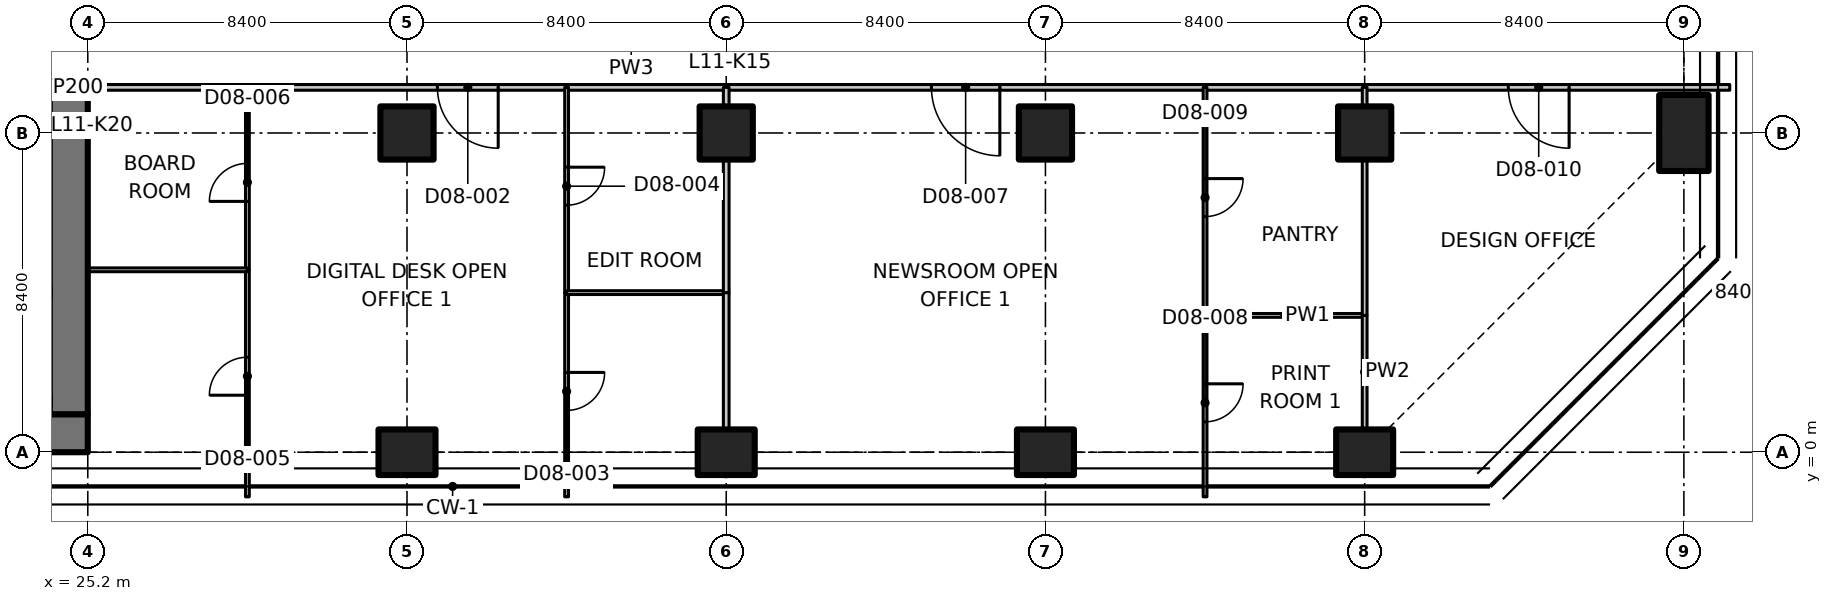
"""IFC4 building model, lengths in metres.
Left out: names, types, materials, properties, quantities, classifications, styles, units other than length and angle.
Written with IfcOpenShell. Run it as: python <this file> out.ifc"""

import sys

from ifc_helpers import new_model, si_unit, direction, frame, frame_2d, origin, origin_2d, place, context, subcontext, project, spatial, polyline, rectangle, outline, extrude, element, fill, save


model = new_model("IFC4")
c1 = context("Model", 3, precision=1e-05, world=origin(), true_north=direction((0.0, 1.0)))
c2 = subcontext(c1, "Body", "Model", "MODEL_VIEW")
j1 = project(units=[si_unit("LENGTHUNIT", "METRE"), si_unit("PLANEANGLEUNIT", "RADIAN")], contexts=[c1])
p1 = place(None, origin())
s1 = spatial("IfcSite", under=j1, at=p1, CompositionType="ELEMENT")
p2 = place(p1, origin())
s2 = spatial("IfcBuilding", under=s1, at=p2, CompositionType="ELEMENT")
p3 = place(p2, frame((0.0, 0.0, 54.5)))
s3 = spatial("IfcBuildingStorey", under=s2, at=p3, CompositionType="ELEMENT", Elevation=54.5)
p4 = place(p3, frame((33.6, 0.0, 0.0), z_axis=(0.0, 0.0, 1.0), x_axis=(0.0, 1.0, 0.0)))
e1 = element("IfcColumn", 1, at=p4, inside=s3, PredefinedType="COLUMN", context=c2, shape_type="SweptSolid", body=[
    extrude(rectangle(XDim=1.2, YDim=1.5, at=origin_2d()), origin(), (0.0, 0.0, 1.0), 3.35),
])
p5 = place(p3, frame((33.6, 8.4, 0.0), z_axis=(0.0, 0.0, 1.0), x_axis=(1.0, 0.0, 0.0)))
e2 = element("IfcColumn", 2, at=p5, inside=s3, PredefinedType="COLUMN", context=c2, shape_type="SweptSolid", body=[
    extrude(rectangle(XDim=1.4, YDim=1.4, at=origin_2d()), origin(), (0.0, 0.0, 1.0), 3.35),
])
p6 = place(p3, frame((42.0, 0.0, 0.0), z_axis=(0.0, 0.0, 1.0), x_axis=(0.0, 1.0, 0.0)))
e3 = element("IfcColumn", 3, at=p6, inside=s3, PredefinedType="COLUMN", context=c2, shape_type="SweptSolid", body=[
    extrude(rectangle(XDim=1.2, YDim=1.5, at=origin_2d()), origin(), (0.0, 0.0, 1.0), 3.35),
])
p7 = place(p3, frame((42.0, 8.4, 0.0), z_axis=(0.0, 0.0, 1.0), x_axis=(1.0, 0.0, 0.0)))
e4 = element("IfcColumn", 4, at=p7, inside=s3, PredefinedType="COLUMN", context=c2, shape_type="SweptSolid", body=[
    extrude(rectangle(XDim=1.4, YDim=1.4, at=origin_2d()), origin(), (0.0, 0.0, 1.0), 3.35),
])
p8 = place(p3, frame((50.4, 0.0, 0.0), z_axis=(0.0, 0.0, 1.0), x_axis=(0.0, 1.0, 0.0)))
e5 = element("IfcColumn", 5, at=p8, inside=s3, PredefinedType="COLUMN", context=c2, shape_type="SweptSolid", body=[
    extrude(rectangle(XDim=1.2, YDim=1.5, at=origin_2d()), origin(), (0.0, 0.0, 1.0), 3.35),
])
p9 = place(p3, frame((50.4, 8.4, 0.0), z_axis=(0.0, 0.0, 1.0), x_axis=(1.0, 0.0, 0.0)))
e6 = element("IfcColumn", 6, at=p9, inside=s3, PredefinedType="COLUMN", context=c2, shape_type="SweptSolid", body=[
    extrude(rectangle(XDim=1.4, YDim=1.4, at=origin_2d()), origin(), (0.0, 0.0, 1.0), 3.35),
])
p10 = place(p3, frame((58.8, 0.0, 0.0), z_axis=(0.0, 0.0, 1.0), x_axis=(0.0, 1.0, 0.0)))
e7 = element("IfcColumn", 7, at=p10, inside=s3, PredefinedType="COLUMN", context=c2, shape_type="SweptSolid", body=[
    extrude(rectangle(XDim=1.2, YDim=1.5, at=origin_2d()), origin(), (0.0, 0.0, 1.0), 3.35),
])
p11 = place(p3, frame((58.8, 8.4, 0.0), z_axis=(0.0, 0.0, 1.0), x_axis=(1.0, 0.0, 0.0)))
e8 = element("IfcColumn", 8, at=p11, inside=s3, PredefinedType="COLUMN", context=c2, shape_type="SweptSolid", body=[
    extrude(rectangle(XDim=1.4, YDim=1.4, at=origin_2d()), origin(), (0.0, 0.0, 1.0), 3.35),
])
p12 = place(p3, frame((67.2, 8.4, 0.0), z_axis=(0.0, 0.0, 1.0), x_axis=(1.0, 0.0, 0.0)))
e9 = element("IfcColumn", 9, at=p12, inside=s3, PredefinedType="COLUMN", context=c2, shape_type="SweptSolid", body=[
    extrude(rectangle(XDim=1.3, YDim=2.0, at=origin_2d()), origin(), (0.0, 0.0, 1.0), 3.35),
])
p13 = place(p3, frame((6.936, 0.5, 0.0), z_axis=(0.0, 0.0, 1.0), x_axis=(1.0, 0.0, 0.0)))
e10 = element("IfcWall", 10, at=p13, inside=s3, PredefinedType="SHEAR", context=c2, shape_type="SweptSolid", body=[
    extrude(rectangle(XDim=18.264, YDim=1.0, at=frame_2d((9.132, 0.0))), origin(), (0.0, 0.0, 1.0), 3.35),
])
p14 = place(p3, frame((24.7, 1.0, 0.0), z_axis=(0.0, 0.0, 1.0), x_axis=(0.0, 1.0, 0.0)))
e11 = element("IfcWall", 11, at=p14, inside=s3, PredefinedType="SHEAR", context=c2, shape_type="SweptSolid", body=[
    extrude(rectangle(XDim=8.8, YDim=1.0, at=frame_2d((4.4, 0.0))), origin(), (0.0, 0.0, 1.0), 3.35),
])
p15 = place(p3, frame((29.4, 9.6, 0.0), z_axis=(0.0, 0.0, 1.0), x_axis=(-1.0, 0.0, 0.0)))
e12 = element("IfcWall", 12, at=p15, inside=s3, PredefinedType="PARTITIONING", context=c2, shape_type="SweptSolid", body=[
    extrude(rectangle(XDim=4.2, YDim=0.15, at=frame_2d((2.1, 0.0))), origin(), (0.0, 0.0, 1.0), 3.33),
])
p16 = place(p3, frame((37.8, 9.6, 0.0), z_axis=(0.0, 0.0, 1.0), x_axis=(-1.0, 0.0, 0.0)))
e13 = element("IfcWall", 13, at=p16, inside=s3, PredefinedType="PARTITIONING", context=c2, shape_type="SweptSolid", body=[
    extrude(rectangle(XDim=8.4, YDim=0.15, at=frame_2d((4.2, 0.0))), origin(), (0.0, 0.0, 1.0), 3.33),
])
p17 = place(p16, frame((1.8, 0.0, 0.0)))
e14 = element("IfcOpeningElement", 14, at=p17, cuts=e13, PredefinedType="OPENING", context=c2, shape_type="SweptSolid", body=[
    extrude(rectangle(XDim=1.6, YDim=2.1, at=frame_2d((0.8, 1.05))), frame((0.0, 0.085, 0.0), z_axis=(0.0, -1.0, 0.0), x_axis=(1.0, 0.0, 0.0)), (0.0, 0.0, 1.0), 0.17),
])
p18 = place(p3, frame((42.0, 9.6, 0.0), z_axis=(0.0, 0.0, 1.0), x_axis=(-1.0, 0.0, 0.0)))
e15 = element("IfcWall", 15, at=p18, inside=s3, PredefinedType="PARTITIONING", context=c2, shape_type="SweptSolid", body=[
    extrude(rectangle(XDim=4.2, YDim=0.15, at=frame_2d((2.1, 0.0))), origin(), (0.0, 0.0, 1.0), 3.33),
])
p19 = place(p3, frame((54.6, 9.6, 0.0), z_axis=(0.0, 0.0, 1.0), x_axis=(-1.0, 0.0, 0.0)))
e16 = element("IfcWall", 16, at=p19, inside=s3, PredefinedType="PARTITIONING", context=c2, shape_type="SweptSolid", body=[
    extrude(rectangle(XDim=12.6, YDim=0.15, at=frame_2d((6.3, 0.0))), origin(), (0.0, 0.0, 1.0), 3.33),
])
p20 = place(p19, frame((5.4, 0.0, 0.0)))
e17 = element("IfcOpeningElement", 17, at=p20, cuts=e16, PredefinedType="OPENING", context=c2, shape_type="SweptSolid", body=[
    extrude(rectangle(XDim=1.8, YDim=2.1, at=frame_2d((0.9, 1.05))), frame((0.0, 0.085, 0.0), z_axis=(0.0, -1.0, 0.0), x_axis=(1.0, 0.0, 0.0)), (0.0, 0.0, 1.0), 0.17),
])
p21 = place(p3, frame((58.8, 9.6, 0.0), z_axis=(0.0, 0.0, 1.0), x_axis=(-1.0, 0.0, 0.0)))
e18 = element("IfcWall", 18, at=p21, inside=s3, PredefinedType="PARTITIONING", context=c2, shape_type="SweptSolid", body=[
    extrude(rectangle(XDim=4.2, YDim=0.15, at=frame_2d((2.1, 0.0))), origin(), (0.0, 0.0, 1.0), 3.33),
])
p22 = place(p3, frame((68.407, 9.6, 0.0), z_axis=(0.0, 0.0, 1.0), x_axis=(-1.0, 0.0, 0.0)))
e19 = element("IfcWall", 19, at=p22, inside=s3, PredefinedType="PARTITIONING", context=c2, shape_type="SweptSolid", body=[
    extrude(outline(polyline([(0.0, 0.0), (9.607, 0.0), (9.607, 3.33), (1.657, 3.33), (1.655, 2.98), (0.759, 2.98), (0.757, 3.33), (0.127, 3.33), (0.0, 3.33), (0.0, 0.0)])), frame((0.0, 0.075, 0.0), z_axis=(0.0, -1.0, 0.0), x_axis=(1.0, 0.0, 0.0)), (0.0, 0.0, 1.0), 0.15),
])
p23 = place(p22, frame((4.227, 0.0, 0.0)))
e20 = element("IfcOpeningElement", 20, at=p23, cuts=e19, PredefinedType="OPENING", context=c2, shape_type="SweptSolid", body=[
    extrude(rectangle(XDim=1.6, YDim=2.1, at=frame_2d((0.8, 1.05))), frame((0.0, 0.085, 0.0), z_axis=(0.0, -1.0, 0.0), x_axis=(1.0, 0.0, 0.0)), (0.0, 0.0, 1.0), 0.17),
])
p24 = place(p3, frame((37.8, 4.2, 0.0), z_axis=(0.0, 0.0, 1.0), x_axis=(0.0, -1.0, 0.0)))
e21 = element("IfcWall", 21, at=p24, inside=s3, PredefinedType="PARTITIONING", context=c2, shape_type="SweptSolid", body=[
    extrude(outline(polyline([(0.0, 0.0), (5.374, 0.0), (5.374, 3.33), (5.3, 3.33), (4.65, 3.33), (4.648, 2.98), (3.752, 2.98), (3.75, 3.33), (0.0, 3.33), (0.0, 0.0)])), frame((0.0, 0.05, 0.0), z_axis=(0.0, -1.0, 0.0), x_axis=(1.0, 0.0, 0.0)), (0.0, 0.0, 1.0), 0.1),
])
p25 = place(p24, frame((2.1, 0.0, 0.0)))
e22 = element("IfcOpeningElement", 22, at=p25, cuts=e21, PredefinedType="OPENING", context=c2, shape_type="SweptSolid", body=[
    extrude(rectangle(XDim=1.0, YDim=2.1, at=frame_2d((0.5, 1.05))), frame((0.0, 0.06, 0.0), z_axis=(0.0, -1.0, 0.0), x_axis=(1.0, 0.0, 0.0)), (0.0, 0.0, 1.0), 0.12),
])
p26 = place(p3, frame((37.8, 9.6, 0.0), z_axis=(0.0, 0.0, 1.0), x_axis=(0.0, -1.0, 0.0)))
e23 = element("IfcWall", 23, at=p26, inside=s3, PredefinedType="PARTITIONING", context=c2, shape_type="SweptSolid", body=[
    extrude(rectangle(XDim=5.4, YDim=0.1, at=frame_2d((2.7, 0.0))), origin(), (0.0, 0.0, 1.0), 3.33),
])
p27 = place(p26, frame((2.1, 0.0, 0.0)))
e24 = element("IfcOpeningElement", 24, at=p27, cuts=e23, PredefinedType="OPENING", context=c2, shape_type="SweptSolid", body=[
    extrude(rectangle(XDim=1.0, YDim=2.1, at=frame_2d((0.5, 1.05))), frame((0.0, 0.06, 0.0), z_axis=(0.0, -1.0, 0.0), x_axis=(1.0, 0.0, 0.0)), (0.0, 0.0, 1.0), 0.12),
])
p28 = place(p3, frame((29.4, -1.174, 0.0), z_axis=(0.0, 0.0, 1.0), x_axis=(0.0, 1.0, 0.0)))
e25 = element("IfcWall", 25, at=p28, inside=s3, PredefinedType="PARTITIONING", context=c2, shape_type="SweptSolid", body=[
    extrude(outline(polyline([(0.0, 0.0), (5.974, 0.0), (5.974, 3.33), (1.624, 3.33), (1.622, 2.98), (0.726, 2.98), (0.724, 3.33), (0.074, 3.33), (0.0, 3.33), (0.0, 0.0)])), frame((0.0, 0.05, 0.0), z_axis=(0.0, -1.0, 0.0), x_axis=(1.0, 0.0, 0.0)), (0.0, 0.0, 1.0), 0.1),
])
p29 = place(p28, frame((2.674, 0.0, 0.0)))
e26 = element("IfcOpeningElement", 26, at=p29, cuts=e25, PredefinedType="OPENING", context=c2, shape_type="SweptSolid", body=[
    extrude(rectangle(XDim=1.0, YDim=2.1, at=frame_2d((0.5, 1.05))), frame((0.0, 0.06, 0.0), z_axis=(0.0, -1.0, 0.0), x_axis=(1.0, 0.0, 0.0)), (0.0, 0.0, 1.0), 0.12),
])
p30 = place(p3, frame((29.4, 4.8, 0.0), z_axis=(0.0, 0.0, 1.0), x_axis=(0.0, 1.0, 0.0)))
e27 = element("IfcWall", 27, at=p30, inside=s3, PredefinedType="PARTITIONING", context=c2, shape_type="SweptSolid", body=[
    extrude(rectangle(XDim=4.8, YDim=0.1, at=frame_2d((2.4, 0.0))), origin(), (0.0, 0.0, 1.0), 3.33),
])
p31 = place(p30, frame((1.8, 0.0, 0.0)))
e28 = element("IfcOpeningElement", 28, at=p31, cuts=e27, PredefinedType="OPENING", context=c2, shape_type="SweptSolid", body=[
    extrude(rectangle(XDim=1.0, YDim=2.1, at=frame_2d((0.5, 1.05))), frame((0.0, 0.06, 0.0), z_axis=(0.0, -1.0, 0.0), x_axis=(1.0, 0.0, 0.0)), (0.0, 0.0, 1.0), 0.12),
])
p32 = place(p3, frame((37.8, 4.2, 0.0), z_axis=(0.0, 0.0, 1.0), x_axis=(1.0, 0.0, 0.0)))
e29 = element("IfcWall", 29, at=p32, inside=s3, PredefinedType="PARTITIONING", context=c2, shape_type="SweptSolid", body=[
    extrude(rectangle(XDim=4.2, YDim=0.1, at=frame_2d((2.1, 0.0))), origin(), (0.0, 0.0, 1.0), 3.33),
])
p33 = place(p3, frame((42.0, 4.2, 0.0), z_axis=(0.0, 0.0, 1.0), x_axis=(0.0, -1.0, 0.0)))
e30 = element("IfcWall", 30, at=p33, inside=s3, PredefinedType="PARTITIONING", context=c2, shape_type="SweptSolid", body=[
    extrude(rectangle(XDim=3.58, YDim=0.15, at=frame_2d((1.79, 0.0))), origin(), (0.0, 0.0, 1.0), 3.33),
])
p34 = place(p3, frame((42.0, 9.6, 0.0), z_axis=(0.0, 0.0, 1.0), x_axis=(0.0, -1.0, 0.0)))
e31 = element("IfcWall", 31, at=p34, inside=s3, PredefinedType="PARTITIONING", context=c2, shape_type="SweptSolid", body=[
    extrude(rectangle(XDim=0.48, YDim=0.15, at=frame_2d((0.24, 0.0))), origin(), (0.0, 0.0, 1.0), 3.33),
])
p35 = place(p3, frame((42.0, 7.68, 0.0), z_axis=(0.0, 0.0, 1.0), x_axis=(0.0, -1.0, 0.0)))
e32 = element("IfcWall", 32, at=p35, inside=s3, PredefinedType="PARTITIONING", context=c2, shape_type="SweptSolid", body=[
    extrude(rectangle(XDim=3.48, YDim=0.15, at=frame_2d((1.74, 0.0))), origin(), (0.0, 0.0, 1.0), 3.33),
])
p36 = place(p3, frame((25.2, 4.8, 0.0), z_axis=(0.0, 0.0, 1.0), x_axis=(1.0, 0.0, 0.0)))
e33 = element("IfcWall", 33, at=p36, inside=s3, PredefinedType="PARTITIONING", context=c2, shape_type="SweptSolid", body=[
    extrude(rectangle(XDim=4.2, YDim=0.1, at=frame_2d((2.1, 0.0))), origin(), (0.0, 0.0, 1.0), 3.33),
])
p37 = place(p3, frame((54.6, 3.6, 0.0), z_axis=(0.0, 0.0, 1.0), x_axis=(0.0, -1.0, 0.0)))
e34 = element("IfcWall", 34, at=p37, inside=s3, PredefinedType="PARTITIONING", context=c2, shape_type="SweptSolid", body=[
    extrude(outline(polyline([(0.0, 0.0), (4.774, 0.0), (4.774, 3.33), (4.7, 3.33), (4.05, 3.33), (4.048, 2.98), (3.152, 2.98), (3.15, 3.33), (0.0, 3.33), (0.0, 0.0)])), frame((0.0, 0.05, 0.0), z_axis=(0.0, -1.0, 0.0), x_axis=(1.0, 0.0, 0.0)), (0.0, 0.0, 1.0), 0.1),
])
p38 = place(p37, frame((1.8, 0.0, 0.0)))
e35 = element("IfcOpeningElement", 35, at=p38, cuts=e34, PredefinedType="OPENING", context=c2, shape_type="SweptSolid", body=[
    extrude(rectangle(XDim=1.0, YDim=2.1, at=frame_2d((0.5, 1.05))), frame((0.0, 0.06, 0.0), z_axis=(0.0, -1.0, 0.0), x_axis=(1.0, 0.0, 0.0)), (0.0, 0.0, 1.0), 0.12),
])
p39 = place(p3, frame((54.6, 9.6, 0.0), z_axis=(0.0, 0.0, 1.0), x_axis=(0.0, -1.0, 0.0)))
e36 = element("IfcWall", 36, at=p39, inside=s3, PredefinedType="PARTITIONING", context=c2, shape_type="SweptSolid", body=[
    extrude(rectangle(XDim=6.0, YDim=0.1, at=frame_2d((3.0, 0.0))), origin(), (0.0, 0.0, 1.0), 3.33),
])
p40 = place(p39, frame((2.4, 0.0, 0.0)))
e37 = element("IfcOpeningElement", 37, at=p40, cuts=e36, PredefinedType="OPENING", context=c2, shape_type="SweptSolid", body=[
    extrude(rectangle(XDim=1.0, YDim=2.1, at=frame_2d((0.5, 1.05))), frame((0.0, 0.06, 0.0), z_axis=(0.0, -1.0, 0.0), x_axis=(1.0, 0.0, 0.0)), (0.0, 0.0, 1.0), 0.12),
])
p41 = place(p3, frame((54.6, 3.6, 0.0), z_axis=(0.0, 0.0, 1.0), x_axis=(1.0, 0.0, 0.0)))
e38 = element("IfcWall", 38, at=p41, inside=s3, PredefinedType="PARTITIONING", context=c2, shape_type="SweptSolid", body=[
    extrude(rectangle(XDim=4.2, YDim=0.1, at=frame_2d((2.1, 0.0))), origin(), (0.0, 0.0, 1.0), 3.33),
])
p42 = place(p3, frame((58.8, 3.6, 0.0), z_axis=(0.0, 0.0, 1.0), x_axis=(0.0, -1.0, 0.0)))
e39 = element("IfcWall", 39, at=p42, inside=s3, PredefinedType="PARTITIONING", context=c2, shape_type="SweptSolid", body=[
    extrude(rectangle(XDim=2.98, YDim=0.125, at=frame_2d((1.49, 0.0))), origin(), (0.0, 0.0, 1.0), 3.33),
])
p43 = place(p3, frame((58.8, 9.6, 0.0), z_axis=(0.0, 0.0, 1.0), x_axis=(0.0, -1.0, 0.0)))
e40 = element("IfcWall", 40, at=p43, inside=s3, PredefinedType="PARTITIONING", context=c2, shape_type="SweptSolid", body=[
    extrude(rectangle(XDim=0.48, YDim=0.125, at=frame_2d((0.24, 0.0))), origin(), (0.0, 0.0, 1.0), 3.33),
])
p44 = place(p3, frame((58.8, 7.68, 0.0), z_axis=(0.0, 0.0, 1.0), x_axis=(0.0, -1.0, 0.0)))
e41 = element("IfcWall", 41, at=p44, inside=s3, PredefinedType="PARTITIONING", context=c2, shape_type="SweptSolid", body=[
    extrude(rectangle(XDim=4.08, YDim=0.125, at=frame_2d((2.04, 0.0))), origin(), (0.0, 0.0, 1.0), 3.33),
])
p45 = place(p17, origin())
e42 = element("IfcDoor", 42, at=p45, inside=s3, OperationType="DOUBLE_DOOR_SINGLE_SWING", PredefinedType="DOOR", context=c2, shape_type="SweptSolid", body=[
    extrude(rectangle(XDim=1.6, YDim=2.1, at=frame_2d((0.8, 1.05))), frame((0.0, 0.025, 0.0), z_axis=(0.0, -1.0, 0.0), x_axis=(1.0, 0.0, 0.0)), (0.0, 0.0, 1.0), 0.05),
])
fill(e14, e42)
p46 = place(p25, origin())
e43 = element("IfcDoor", 43, at=p46, inside=s3, OperationType="SINGLE_SWING_LEFT", PredefinedType="DOOR", context=c2, shape_type="SweptSolid", body=[
    extrude(rectangle(XDim=1.0, YDim=2.1, at=frame_2d((0.5, 1.05))), frame((0.0, 0.025, 0.0), z_axis=(0.0, -1.0, 0.0), x_axis=(1.0, 0.0, 0.0)), (0.0, 0.0, 1.0), 0.05),
])
fill(e22, e43)
p47 = place(p27, origin())
e44 = element("IfcDoor", 44, at=p47, inside=s3, OperationType="SINGLE_SWING_LEFT", PredefinedType="DOOR", context=c2, shape_type="SweptSolid", body=[
    extrude(rectangle(XDim=1.0, YDim=2.1, at=frame_2d((0.5, 1.05))), frame((0.0, 0.025, 0.0), z_axis=(0.0, -1.0, 0.0), x_axis=(1.0, 0.0, 0.0)), (0.0, 0.0, 1.0), 0.05),
])
fill(e24, e44)
p48 = place(p29, origin())
e45 = element("IfcDoor", 45, at=p48, inside=s3, OperationType="SINGLE_SWING_LEFT", PredefinedType="DOOR", context=c2, shape_type="SweptSolid", body=[
    extrude(rectangle(XDim=1.0, YDim=2.1, at=frame_2d((0.5, 1.05))), frame((0.0, 0.025, 0.0), z_axis=(0.0, -1.0, 0.0), x_axis=(1.0, 0.0, 0.0)), (0.0, 0.0, 1.0), 0.05),
])
fill(e26, e45)
p49 = place(p31, origin())
e46 = element("IfcDoor", 46, at=p49, inside=s3, OperationType="SINGLE_SWING_LEFT", PredefinedType="DOOR", context=c2, shape_type="SweptSolid", body=[
    extrude(rectangle(XDim=1.0, YDim=2.1, at=frame_2d((0.5, 1.05))), frame((0.0, 0.025, 0.0), z_axis=(0.0, -1.0, 0.0), x_axis=(1.0, 0.0, 0.0)), (0.0, 0.0, 1.0), 0.05),
])
fill(e28, e46)
p50 = place(p20, origin())
e47 = element("IfcDoor", 47, at=p50, inside=s3, OperationType="DOUBLE_DOOR_SINGLE_SWING", PredefinedType="DOOR", context=c2, shape_type="SweptSolid", body=[
    extrude(rectangle(XDim=1.8, YDim=2.1, at=frame_2d((0.9, 1.05))), frame((0.0, 0.025, 0.0), z_axis=(0.0, -1.0, 0.0), x_axis=(1.0, 0.0, 0.0)), (0.0, 0.0, 1.0), 0.05),
])
fill(e17, e47)
p51 = place(p38, origin())
e48 = element("IfcDoor", 48, at=p51, inside=s3, OperationType="SINGLE_SWING_LEFT", PredefinedType="DOOR", context=c2, shape_type="SweptSolid", body=[
    extrude(rectangle(XDim=1.0, YDim=2.1, at=frame_2d((0.5, 1.05))), frame((0.0, 0.025, 0.0), z_axis=(0.0, -1.0, 0.0), x_axis=(1.0, 0.0, 0.0)), (0.0, 0.0, 1.0), 0.05),
])
fill(e35, e48)
p52 = place(p40, origin())
e49 = element("IfcDoor", 49, at=p52, inside=s3, OperationType="SINGLE_SWING_LEFT", PredefinedType="DOOR", context=c2, shape_type="SweptSolid", body=[
    extrude(rectangle(XDim=1.0, YDim=2.1, at=frame_2d((0.5, 1.05))), frame((0.0, 0.025, 0.0), z_axis=(0.0, -1.0, 0.0), x_axis=(1.0, 0.0, 0.0)), (0.0, 0.0, 1.0), 0.05),
])
fill(e37, e49)
p53 = place(p23, origin())
e50 = element("IfcDoor", 50, at=p53, inside=s3, OperationType="DOUBLE_DOOR_SINGLE_SWING", PredefinedType="DOOR", context=c2, shape_type="SweptSolid", body=[
    extrude(rectangle(XDim=1.6, YDim=2.1, at=frame_2d((0.8, 1.05))), frame((0.0, 0.025, 0.0), z_axis=(0.0, -1.0, 0.0), x_axis=(1.0, 0.0, 0.0)), (0.0, 0.0, 1.0), 0.05),
])
fill(e20, e50)
save(model, sys.argv[1])
